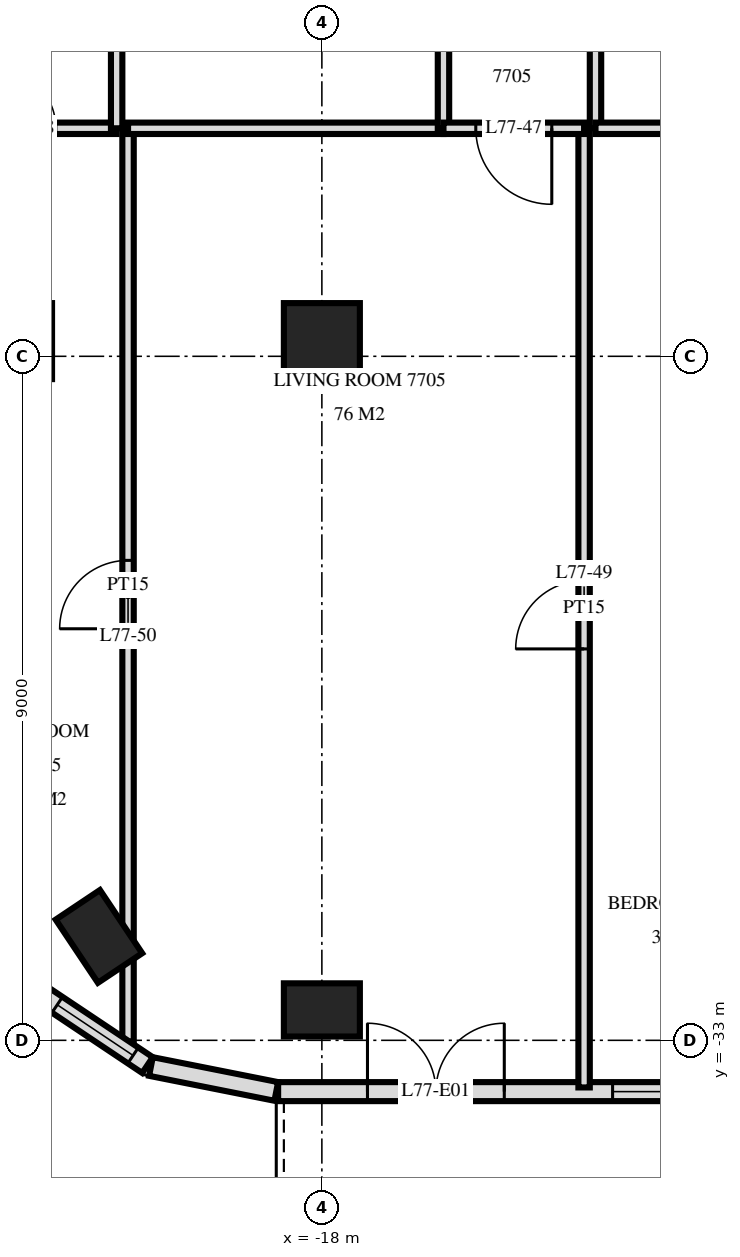
"""IFC4 building model, lengths in metres.
Left out: names, types, materials, properties, quantities, classifications, styles, units other than length and angle.
Written with IfcOpenShell. Run it as: python <this file> out.ifc"""

import sys

from ifc_helpers import new_model, si_unit, direction, frame, frame_2d, origin, origin_2d, place, context, subcontext, project, spatial, rectangle, extrude, element, fill, save


model = new_model("IFC4")
c1 = context("Model", 3, precision=1e-05, world=origin(), true_north=direction((0.0, 1.0)))
c2 = subcontext(c1, "Body", "Model", "MODEL_VIEW")
j1 = project(units=[si_unit("LENGTHUNIT", "METRE"), si_unit("PLANEANGLEUNIT", "RADIAN")], contexts=[c1])
p1 = place(None, origin())
s1 = spatial("IfcSite", under=j1, at=p1, CompositionType="ELEMENT")
p2 = place(p1, origin())
s2 = spatial("IfcBuilding", under=s1, at=p2, CompositionType="ELEMENT")
p3 = place(p2, frame((0.0, 0.0, 291.1)))
s3 = spatial("IfcBuildingStorey", under=s2, at=p3, CompositionType="ELEMENT", Elevation=291.1)
for number, where, z_axis, x_axis in (
    (1, (-21.9, -23.8, 0.0), (0.0, 0.0, 1.0), (0.0, 1.0, 0.0)),
    (2, (-20.933, -31.633, 0.0), (0.0, 0.0, 1.0), (-0.556, 0.831, 0.0)),
    (3, (-18.0, -32.6, 0.0), (0.0, 0.0, 1.0), (1.0, 0.0, 0.0)),
):
    element("IfcColumn", number, at=place(p3, frame(where, z_axis=z_axis, x_axis=x_axis)), inside=s3, PredefinedType="COLUMN", context=c2, shape_type="SweptSolid", body=[
        extrude(rectangle(XDim=1.0, YDim=0.7, at=origin_2d()), origin(), (0.0, 0.0, 1.0), 3.5),
    ])
p4 = place(p3, frame((-18.0, -23.8, 0.0), z_axis=(0.0, 0.0, 1.0), x_axis=(1.0, 0.0, 0.0)))
e4 = element("IfcColumn", 4, at=p4, inside=s3, PredefinedType="COLUMN", context=c2, shape_type="SweptSolid", body=[
    extrude(rectangle(XDim=1.0, YDim=1.0, at=origin_2d()), origin(), (0.0, 0.0, 1.0), 3.5),
])
p5 = place(p3, frame((-21.671, -32.406, 0.0), z_axis=(0.0, 0.0, 1.0), x_axis=(0.831482937015, -0.55555029066, 0.0)))
e5 = element("IfcWall", 5, at=p5, inside=s3, PredefinedType="SOLIDWALL", context=c2, shape_type="SweptSolid", body=[
    extrude(rectangle(XDim=1.656, YDim=0.25, at=frame_2d((0.828, 0.0))), origin(), (0.0, 0.0, 1.0), 3.22),
])
p6 = place(p5, frame((0.228, 0.0, 0.9)))
e6 = element("IfcOpeningElement", 6, at=p6, cuts=e5, PredefinedType="OPENING", context=c2, shape_type="SweptSolid", body=[
    extrude(rectangle(XDim=1.2, YDim=1.5, at=frame_2d((0.6, 0.75))), frame((0.0, 0.135, 0.0), z_axis=(0.0, -1.0, 0.0), x_axis=(1.0, 0.0, 0.0)), (0.0, 0.0, 1.0), 0.27),
])
p7 = place(p3, frame((-20.249, -33.344, 0.0), z_axis=(0.0, 0.0, 1.0), x_axis=(0.980770110232, -0.195166572128, 0.0)))
e7 = element("IfcWall", 7, at=p7, inside=s3, PredefinedType="SOLIDWALL", context=c2, shape_type="SweptSolid", body=[
    extrude(rectangle(XDim=1.681, YDim=0.25, at=frame_2d((0.841, 0.0))), origin(), (0.0, 0.0, 1.0), 3.22),
])
p8 = place(p3, frame((-18.575, -33.675, 0.0), z_axis=(0.0, 0.0, 1.0), x_axis=(1.0, 0.0, 0.0)))
e8 = element("IfcWall", 8, at=p8, inside=s3, PredefinedType="SOLIDWALL", context=c2, shape_type="SweptSolid", body=[
    extrude(rectangle(XDim=37.151, YDim=0.25, at=frame_2d((18.575, 0.0))), origin(), (0.0, 0.0, 1.0), 3.22),
])
p9 = place(p8, frame((1.175, 0.0, 0.0)))
e9 = element("IfcOpeningElement", 9, at=p9, cuts=e8, PredefinedType="OPENING", context=c2, shape_type="SweptSolid", body=[
    extrude(rectangle(XDim=1.8, YDim=2.4, at=frame_2d((0.9, 1.2))), frame((0.0, 0.135, 0.0), z_axis=(0.0, -1.0, 0.0), x_axis=(1.0, 0.0, 0.0)), (0.0, 0.0, 1.0), 0.27),
])
p10 = place(p8, frame((4.4, 0.0, 0.9)))
e10 = element("IfcOpeningElement", 10, at=p10, cuts=e8, PredefinedType="OPENING", context=c2, shape_type="SweptSolid", body=[
    extrude(rectangle(XDim=1.8, YDim=1.5, at=frame_2d((0.9, 0.75))), frame((0.0, 0.135, 0.0), z_axis=(0.0, -1.0, 0.0), x_axis=(1.0, 0.0, 0.0)), (0.0, 0.0, 1.0), 0.27),
])
p11 = place(p8, frame((6.875, 0.0, 0.9)))
e11 = element("IfcOpeningElement", 11, at=p11, cuts=e8, PredefinedType="OPENING", context=c2, shape_type="SweptSolid", body=[
    extrude(rectangle(XDim=2.4, YDim=1.5, at=frame_2d((1.2, 0.75))), frame((0.0, 0.135, 0.0), z_axis=(0.0, -1.0, 0.0), x_axis=(1.0, 0.0, 0.0)), (0.0, 0.0, 1.0), 0.27),
])
p12 = place(p8, frame((10.175, 0.0, 0.0)))
e12 = element("IfcOpeningElement", 12, at=p12, cuts=e8, PredefinedType="OPENING", context=c2, shape_type="SweptSolid", body=[
    extrude(rectangle(XDim=1.8, YDim=2.4, at=frame_2d((0.9, 1.2))), frame((0.0, 0.135, 0.0), z_axis=(0.0, -1.0, 0.0), x_axis=(1.0, 0.0, 0.0)), (0.0, 0.0, 1.0), 0.27),
])
p13 = place(p8, frame((13.175, 0.0, 0.0)))
e13 = element("IfcOpeningElement", 13, at=p13, cuts=e8, PredefinedType="OPENING", context=c2, shape_type="SweptSolid", body=[
    extrude(rectangle(XDim=1.8, YDim=2.4, at=frame_2d((0.9, 1.2))), frame((0.0, 0.135, 0.0), z_axis=(0.0, -1.0, 0.0), x_axis=(1.0, 0.0, 0.0)), (0.0, 0.0, 1.0), 0.27),
])
p14 = place(p8, frame((15.875, 0.0, 0.9)))
e14 = element("IfcOpeningElement", 14, at=p14, cuts=e8, PredefinedType="OPENING", context=c2, shape_type="SweptSolid", body=[
    extrude(rectangle(XDim=2.4, YDim=1.5, at=frame_2d((1.2, 0.75))), frame((0.0, 0.135, 0.0), z_axis=(0.0, -1.0, 0.0), x_axis=(1.0, 0.0, 0.0)), (0.0, 0.0, 1.0), 0.27),
])
p15 = place(p8, frame((19.175, 0.0, 0.0)))
e15 = element("IfcOpeningElement", 15, at=p15, cuts=e8, PredefinedType="OPENING", context=c2, shape_type="SweptSolid", body=[
    extrude(rectangle(XDim=1.8, YDim=2.4, at=frame_2d((0.9, 1.2))), frame((0.0, 0.135, 0.0), z_axis=(0.0, -1.0, 0.0), x_axis=(1.0, 0.0, 0.0)), (0.0, 0.0, 1.0), 0.27),
])
p16 = place(p8, frame((21.875, 0.0, 0.9)))
e16 = element("IfcOpeningElement", 16, at=p16, cuts=e8, PredefinedType="OPENING", context=c2, shape_type="SweptSolid", body=[
    extrude(rectangle(XDim=2.4, YDim=1.5, at=frame_2d((1.2, 0.75))), frame((0.0, 0.135, 0.0), z_axis=(0.0, -1.0, 0.0), x_axis=(1.0, 0.0, 0.0)), (0.0, 0.0, 1.0), 0.27),
])
p17 = place(p8, frame((25.063, 0.0, 0.9)))
e17 = element("IfcOpeningElement", 17, at=p17, cuts=e8, PredefinedType="OPENING", context=c2, shape_type="SweptSolid", body=[
    extrude(rectangle(XDim=1.8, YDim=1.5, at=frame_2d((0.9, 0.75))), frame((0.0, 0.135, 0.0), z_axis=(0.0, -1.0, 0.0), x_axis=(1.0, 0.0, 0.0)), (0.0, 0.0, 1.0), 0.27),
])
p18 = place(p8, frame((27.838, 0.0, 0.0)))
e18 = element("IfcOpeningElement", 18, at=p18, cuts=e8, PredefinedType="OPENING", context=c2, shape_type="SweptSolid", body=[
    extrude(rectangle(XDim=1.8, YDim=2.4, at=frame_2d((0.9, 1.2))), frame((0.0, 0.135, 0.0), z_axis=(0.0, -1.0, 0.0), x_axis=(1.0, 0.0, 0.0)), (0.0, 0.0, 1.0), 0.27),
])
p19 = place(p8, frame((31.175, 0.0, 0.0)))
e19 = element("IfcOpeningElement", 19, at=p19, cuts=e8, PredefinedType="OPENING", context=c2, shape_type="SweptSolid", body=[
    extrude(rectangle(XDim=1.8, YDim=2.4, at=frame_2d((0.9, 1.2))), frame((0.0, 0.135, 0.0), z_axis=(0.0, -1.0, 0.0), x_axis=(1.0, 0.0, 0.0)), (0.0, 0.0, 1.0), 0.27),
])
p20 = place(p3, frame((-14.4, -21.0, 0.0), z_axis=(0.0, 0.0, 1.0), x_axis=(0.0, 1.0, 0.0)))
e20 = element("IfcWall", 20, at=p20, inside=s3, PredefinedType="PARTITIONING", context=c2, shape_type="SweptSolid", body=[
    extrude(rectangle(XDim=4.2, YDim=0.15, at=frame_2d((2.1, 0.0))), origin(), (0.0, 0.0, 1.0), 3.22),
])
p21 = place(p20, frame((1.6, 0.0, 0.0)))
e21 = element("IfcOpeningElement", 21, at=p21, cuts=e20, PredefinedType="OPENING", context=c2, shape_type="SweptSolid", body=[
    extrude(rectangle(XDim=1.0, YDim=2.1, at=frame_2d((0.5, 1.05))), frame((0.0, 0.085, 0.0), z_axis=(0.0, -1.0, 0.0), x_axis=(1.0, 0.0, 0.0)), (0.0, 0.0, 1.0), 0.17),
])
p22 = place(p3, frame((-14.55, -33.62, 0.0), z_axis=(0.0, 0.0, 1.0), x_axis=(0.0, 1.0, 0.0)))
e22 = element("IfcWall", 22, at=p22, inside=s3, PredefinedType="PARTITIONING", context=c2, shape_type="SweptSolid", body=[
    extrude(rectangle(XDim=12.62, YDim=0.15, at=frame_2d((6.31, 0.0))), origin(), (0.0, 0.0, 1.0), 3.22),
])
p23 = place(p22, frame((5.77, 0.0, 0.0)))
e23 = element("IfcOpeningElement", 23, at=p23, cuts=e22, PredefinedType="OPENING", context=c2, shape_type="SweptSolid", body=[
    extrude(rectangle(XDim=0.9, YDim=2.1, at=frame_2d((0.45, 1.05))), frame((0.0, 0.085, 0.0), z_axis=(0.0, -1.0, 0.0), x_axis=(1.0, 0.0, 0.0)), (0.0, 0.0, 1.0), 0.17),
])
p24 = place(p3, frame((-16.4, -21.0, 0.0), z_axis=(0.0, 0.0, 1.0), x_axis=(0.0, 1.0, 0.0)))
e24 = element("IfcWall", 24, at=p24, inside=s3, PredefinedType="PARTITIONING", context=c2, shape_type="SweptSolid", body=[
    extrude(rectangle(XDim=4.2, YDim=0.15, at=frame_2d((2.1, 0.0))), origin(), (0.0, 0.0, 1.0), 3.22),
])
p25 = place(p24, frame((1.6, 0.0, 0.0)))
e25 = element("IfcOpeningElement", 25, at=p25, cuts=e24, PredefinedType="OPENING", context=c2, shape_type="SweptSolid", body=[
    extrude(rectangle(XDim=1.0, YDim=2.1, at=frame_2d((0.5, 1.05))), frame((0.0, 0.085, 0.0), z_axis=(0.0, -1.0, 0.0), x_axis=(1.0, 0.0, 0.0)), (0.0, 0.0, 1.0), 0.17),
])
p26 = place(p3, frame((-20.55, -33.017, 0.0), z_axis=(0.0, 0.0, 1.0), x_axis=(0.0, 1.0, 0.0)))
e26 = element("IfcWall", 26, at=p26, inside=s3, PredefinedType="PARTITIONING", context=c2, shape_type="SweptSolid", body=[
    extrude(rectangle(XDim=12.017, YDim=0.15, at=frame_2d((6.008, 0.0))), origin(), (0.0, 0.0, 1.0), 3.22),
])
p27 = place(p26, frame((5.432, 0.0, 0.0)))
e27 = element("IfcOpeningElement", 27, at=p27, cuts=e26, PredefinedType="OPENING", context=c2, shape_type="SweptSolid", body=[
    extrude(rectangle(XDim=0.9, YDim=2.1, at=frame_2d((0.45, 1.05))), frame((0.0, 0.085, 0.0), z_axis=(0.0, -1.0, 0.0), x_axis=(1.0, 0.0, 0.0)), (0.0, 0.0, 1.0), 0.17),
])
p28 = place(p3, frame((-20.7, -21.0, 0.0), z_axis=(0.0, 0.0, 1.0), x_axis=(0.0, 1.0, 0.0)))
e28 = element("IfcWall", 28, at=p28, inside=s3, PredefinedType="PARTITIONING", context=c2, shape_type="SweptSolid", body=[
    extrude(rectangle(XDim=4.2, YDim=0.15, at=frame_2d((2.1, 0.0))), origin(), (0.0, 0.0, 1.0), 3.22),
])
p29 = place(p3, frame((-16.4, -21.0, 0.0), z_axis=(0.0, 0.0, 1.0), x_axis=(1.0, 0.0, 0.0)))
e29 = element("IfcWall", 29, at=p29, inside=s3, PredefinedType="PARTITIONING", context=c2, shape_type="SweptSolid", body=[
    extrude(rectangle(XDim=1.85, YDim=0.15, at=frame_2d((0.925, 0.0))), origin(), (0.0, 0.0, 1.0), 3.22),
])
p30 = place(p29, frame((0.425, 0.0, 0.0)))
e30 = element("IfcOpeningElement", 30, at=p30, cuts=e29, PredefinedType="OPENING", context=c2, shape_type="SweptSolid", body=[
    extrude(rectangle(XDim=1.0, YDim=2.1, at=frame_2d((0.5, 1.05))), frame((0.0, 0.085, 0.0), z_axis=(0.0, -1.0, 0.0), x_axis=(1.0, 0.0, 0.0)), (0.0, 0.0, 1.0), 0.17),
])
p31 = place(p3, frame((-22.92, -21.0, 0.0), z_axis=(0.0, 0.0, 1.0), x_axis=(1.0, 0.0, 0.0)))
e31 = element("IfcWall", 31, at=p31, inside=s3, PredefinedType="PARTITIONING", context=c2, shape_type="SweptSolid", body=[
    extrude(rectangle(XDim=2.22, YDim=0.15, at=frame_2d((1.11, 0.0))), origin(), (0.0, 0.0, 1.0), 3.22),
])
p32 = place(p31, frame((0.62, 0.0, 0.0)))
e32 = element("IfcOpeningElement", 32, at=p32, cuts=e31, PredefinedType="OPENING", context=c2, shape_type="SweptSolid", body=[
    extrude(rectangle(XDim=0.8, YDim=2.1, at=frame_2d((0.4, 1.05))), frame((0.0, 0.085, 0.0), z_axis=(0.0, -1.0, 0.0), x_axis=(1.0, 0.0, 0.0)), (0.0, 0.0, 1.0), 0.17),
])
p33 = place(p3, frame((-20.55, -21.0, 0.0), z_axis=(0.0, 0.0, 1.0), x_axis=(1.0, 0.0, 0.0)))
e33 = element("IfcWall", 33, at=p33, inside=s3, PredefinedType="PARTITIONING", context=c2, shape_type="SweptSolid", body=[
    extrude(rectangle(XDim=4.15, YDim=0.15, at=frame_2d((2.075, 0.0))), origin(), (0.0, 0.0, 1.0), 3.22),
])
p34 = place(p3, frame((-14.4, -21.0, 0.0), z_axis=(0.0, 0.0, 1.0), x_axis=(1.0, 0.0, 0.0)))
e34 = element("IfcWall", 34, at=p34, inside=s3, PredefinedType="PARTITIONING", context=c2, shape_type="SweptSolid", body=[
    extrude(rectangle(XDim=2.4, YDim=0.15, at=frame_2d((1.2, 0.0))), origin(), (0.0, 0.0, 1.0), 3.22),
])
p35 = place(p6, origin())
e35 = element("IfcWindow", 35, at=p35, inside=s3, PartitioningType="SINGLE_PANEL", PredefinedType="WINDOW", context=c2, shape_type="SweptSolid", body=[
    extrude(rectangle(XDim=1.2, YDim=1.5, at=frame_2d((0.6, 0.75))), frame((0.0, 0.03, 0.0), z_axis=(0.0, -1.0, 0.0), x_axis=(1.0, 0.0, 0.0)), (0.0, 0.0, 1.0), 0.06),
])
fill(e6, e35)
p36 = place(p9, origin())
e36 = element("IfcDoor", 36, at=p36, inside=s3, OperationType="DOUBLE_DOOR_SINGLE_SWING", PredefinedType="DOOR", context=c2, shape_type="SweptSolid", body=[
    extrude(rectangle(XDim=1.8, YDim=2.4, at=frame_2d((0.9, 1.2))), frame((0.0, 0.025, 0.0), z_axis=(0.0, -1.0, 0.0), x_axis=(1.0, 0.0, 0.0)), (0.0, 0.0, 1.0), 0.05),
])
fill(e9, e36)
p37 = place(p10, origin())
e37 = element("IfcWindow", 37, at=p37, inside=s3, PartitioningType="SINGLE_PANEL", PredefinedType="WINDOW", context=c2, shape_type="SweptSolid", body=[
    extrude(rectangle(XDim=1.8, YDim=1.5, at=frame_2d((0.9, 0.75))), frame((0.0, 0.03, 0.0), z_axis=(0.0, -1.0, 0.0), x_axis=(1.0, 0.0, 0.0)), (0.0, 0.0, 1.0), 0.06),
])
fill(e10, e37)
p38 = place(p30, frame((0.5, 0.0, 0.0), z_axis=(0.0, 0.0, 1.0), x_axis=(-1.0, 0.0, 0.0)))
e38 = element("IfcDoor", 38, at=p38, inside=s3, OperationType="SINGLE_SWING_RIGHT", PredefinedType="DOOR", context=c2, shape_type="SweptSolid", body=[
    extrude(rectangle(XDim=1.0, YDim=2.1, at=frame_2d((0.0, 1.05))), frame((0.0, -0.025, 0.0), z_axis=(0.0, 1.0, 0.0), x_axis=(-1.0, 0.0, 0.0)), (0.0, 0.0, 1.0), 0.05),
])
fill(e30, e38)
p39 = place(p32, origin())
e39 = element("IfcDoor", 39, at=p39, inside=s3, OperationType="SINGLE_SWING_RIGHT", PredefinedType="DOOR", context=c2, shape_type="SweptSolid", body=[
    extrude(rectangle(XDim=0.8, YDim=2.1, at=frame_2d((0.4, 1.05))), frame((0.0, 0.025, 0.0), z_axis=(0.0, -1.0, 0.0), x_axis=(1.0, 0.0, 0.0)), (0.0, 0.0, 1.0), 0.05),
])
fill(e32, e39)
p40 = place(p23, origin())
e40 = element("IfcDoor", 40, at=p40, inside=s3, OperationType="SINGLE_SWING_RIGHT", PredefinedType="DOOR", context=c2, shape_type="SweptSolid", body=[
    extrude(rectangle(XDim=0.9, YDim=2.1, at=frame_2d((0.45, 1.05))), frame((0.0, 0.025, 0.0), z_axis=(0.0, -1.0, 0.0), x_axis=(1.0, 0.0, 0.0)), (0.0, 0.0, 1.0), 0.05),
])
fill(e23, e40)
p41 = place(p27, origin())
e41 = element("IfcDoor", 41, at=p41, inside=s3, OperationType="SINGLE_SWING_RIGHT", PredefinedType="DOOR", context=c2, shape_type="SweptSolid", body=[
    extrude(rectangle(XDim=0.9, YDim=2.1, at=frame_2d((0.45, 1.05))), frame((0.0, 0.025, 0.0), z_axis=(0.0, -1.0, 0.0), x_axis=(1.0, 0.0, 0.0)), (0.0, 0.0, 1.0), 0.05),
])
fill(e27, e41)
save(model, sys.argv[1])
